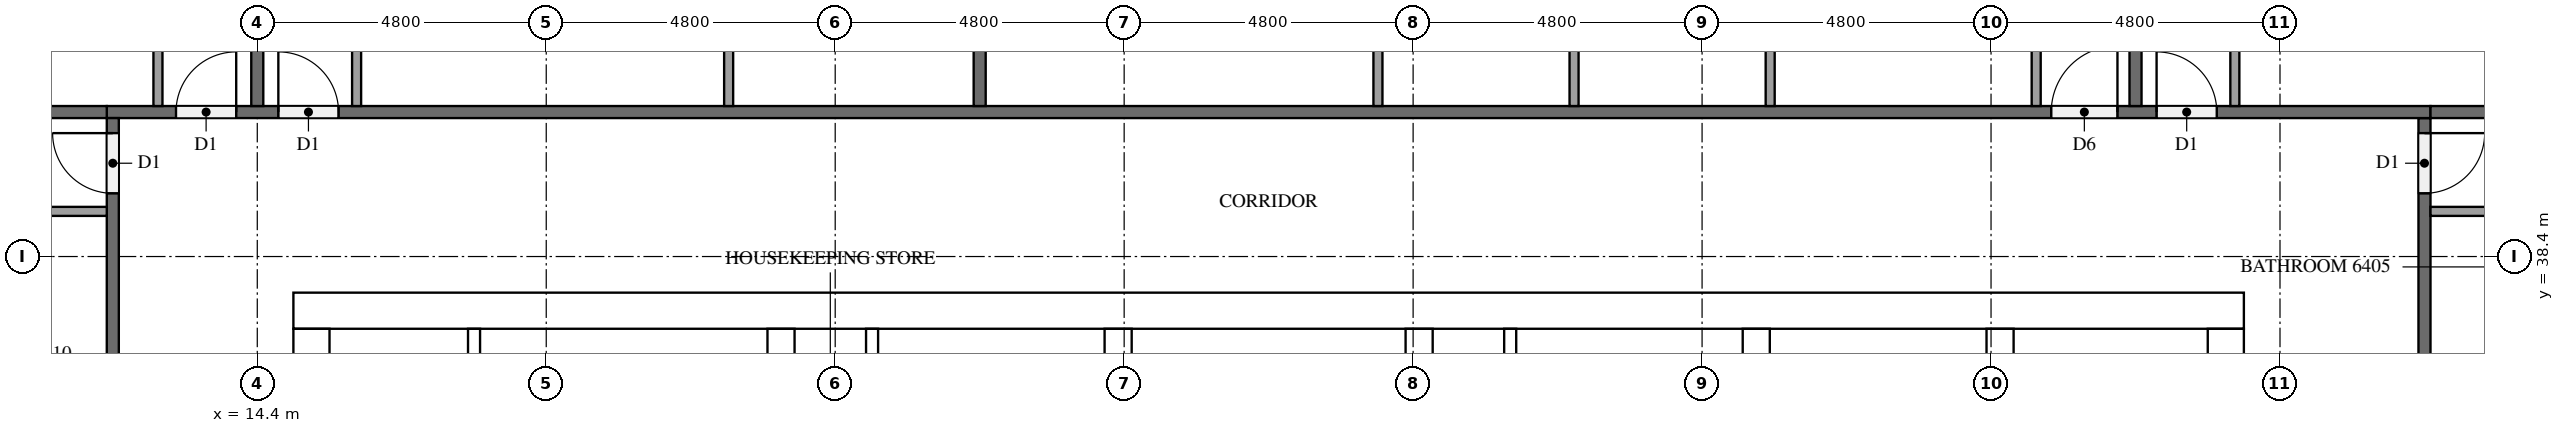
"""IFC4 building model, lengths in metres.
Left out: names, types, materials, properties, quantities, classifications, styles, units other than length and angle.
Written with IfcOpenShell. Run it as: python <this file> out.ifc"""

import sys

from ifc_helpers import new_model, si_unit, direction, frame, frame_2d, origin, place, context, subcontext, project, spatial, rectangle, extrude, element, fill, save


model = new_model("IFC4")
c1 = context("Model", 3, precision=1e-05, world=origin(), true_north=direction((0.0, 1.0)))
c2 = subcontext(c1, "Body", "Model", "MODEL_VIEW")
j1 = project(units=[si_unit("LENGTHUNIT", "METRE"), si_unit("PLANEANGLEUNIT", "RADIAN")], contexts=[c1])
p1 = place(None, origin())
s1 = spatial("IfcSite", under=j1, at=p1, CompositionType="ELEMENT")
p2 = place(p1, origin())
s2 = spatial("IfcBuilding", under=s1, at=p2, CompositionType="ELEMENT")
p3 = place(p2, frame((0.0, 0.0, 245.7)))
s3 = spatial("IfcBuildingStorey", under=s2, at=p3, CompositionType="ELEMENT", Elevation=245.7)
p4 = place(p3, frame((15.0, 37.5, 0.0), z_axis=(0.0, 0.0, 1.0), x_axis=(1.0, 0.0, 0.0)))
e1 = element("IfcWall", 1, at=p4, inside=s3, PredefinedType="SHEAR", context=c2, shape_type="SweptSolid", body=[
    extrude(rectangle(XDim=32.4, YDim=0.6, at=frame_2d((16.2, 0.0))), origin(), (0.0, 0.0, 1.0), 3.2),
])
p5 = place(p4, frame((15.3, 0.0, 0.0)))
e2 = element("IfcOpeningElement", 2, at=p5, cuts=e1, PredefinedType="OPENING", context=c2, shape_type="SweptSolid", body=[
    extrude(rectangle(XDim=1.8, YDim=2.1, at=frame_2d((0.9, 1.05))), frame((0.0, 0.31, 0.0), z_axis=(0.0, -1.0, 0.0), x_axis=(1.0, 0.0, 0.0)), (0.0, 0.0, 1.0), 0.62),
])
p6 = place(p4, frame((1.25, 0.0, 0.0)))
e3 = element("IfcOpeningElement", 3, at=p6, cuts=e1, PredefinedType="OPENING", context=c2, shape_type="SweptSolid", body=[
    extrude(rectangle(XDim=1.0, YDim=2.1, at=frame_2d((0.5, 1.05))), frame((0.0, 0.31, 0.0), z_axis=(0.0, -1.0, 0.0), x_axis=(1.0, 0.0, 0.0)), (0.0, 0.0, 1.0), 0.62),
])
p7 = place(p4, frame((4.988, 0.0, 0.0)))
e4 = element("IfcOpeningElement", 4, at=p7, cuts=e1, PredefinedType="OPENING", context=c2, shape_type="SweptSolid", body=[
    extrude(rectangle(XDim=1.0, YDim=2.1, at=frame_2d((0.5, 1.05))), frame((0.0, 0.31, 0.0), z_axis=(0.0, -1.0, 0.0), x_axis=(1.0, 0.0, 0.0)), (0.0, 0.0, 1.0), 0.62),
])
p8 = place(p3, frame((15.3, 15.6, 0.0), z_axis=(0.0, 0.0, 1.0), x_axis=(0.0, 1.0, 0.0)))
e5 = element("IfcWall", 5, at=p8, inside=s3, PredefinedType="SHEAR", context=c2, shape_type="SweptSolid", body=[
    extrude(rectangle(XDim=21.6, YDim=0.6, at=frame_2d((10.8, 0.0))), origin(), (0.0, 0.0, 1.0), 3.2),
])
p9 = place(p8, frame((5.16, 0.0, 0.0)))
e6 = element("IfcOpeningElement", 6, at=p9, cuts=e5, PredefinedType="OPENING", context=c2, shape_type="SweptSolid", body=[
    extrude(rectangle(XDim=1.2, YDim=2.1, at=frame_2d((0.6, 1.05))), frame((0.0, 0.31, 0.0), z_axis=(0.0, -1.0, 0.0), x_axis=(1.0, 0.0, 0.0)), (0.0, 0.0, 1.0), 0.62),
])
p10 = place(p3, frame((47.1, 15.6, 0.0), z_axis=(0.0, 0.0, 1.0), x_axis=(0.0, 1.0, 0.0)))
e7 = element("IfcWall", 7, at=p10, inside=s3, PredefinedType="SHEAR", context=c2, shape_type="SweptSolid", body=[
    extrude(rectangle(XDim=21.6, YDim=0.6, at=frame_2d((10.8, 0.0))), origin(), (0.0, 0.0, 1.0), 3.2),
])
p11 = place(p10, frame((10.5, 0.0, 0.0)))
e8 = element("IfcOpeningElement", 8, at=p11, cuts=e7, PredefinedType="OPENING", context=c2, shape_type="SweptSolid", body=[
    extrude(rectangle(XDim=1.2, YDim=2.1, at=frame_2d((0.6, 1.05))), frame((0.0, 0.31, 0.0), z_axis=(0.0, -1.0, 0.0), x_axis=(1.0, 0.0, 0.0)), (0.0, 0.0, 1.0), 0.62),
])
p12 = place(p3, frame((23.1, 15.6, 0.0), z_axis=(0.0, 0.0, 1.0), x_axis=(0.0, 1.0, 0.0)))
e9 = element("IfcWall", 9, at=p12, inside=s3, PredefinedType="SHEAR", context=c2, shape_type="SweptSolid", body=[
    extrude(rectangle(XDim=21.6, YDim=0.45, at=frame_2d((10.8, 0.0))), origin(), (0.0, 0.0, 1.0), 3.2),
])
p13 = place(p3, frame((39.3, 27.75, 0.0), z_axis=(0.0, 0.0, 1.0), x_axis=(0.0, 1.0, 0.0)))
e10 = element("IfcWall", 10, at=p13, inside=s3, PredefinedType="SHEAR", context=c2, shape_type="SweptSolid", body=[
    extrude(rectangle(XDim=9.45, YDim=0.45, at=frame_2d((4.725, 0.0))), origin(), (0.0, 0.0, 1.0), 3.2),
])
p14 = place(p3, frame((43.35, 27.75, 0.0), z_axis=(0.0, 0.0, 1.0), x_axis=(0.0, 1.0, 0.0)))
e11 = element("IfcWall", 11, at=p14, inside=s3, PredefinedType="SHEAR", context=c2, shape_type="SweptSolid", body=[
    extrude(rectangle(XDim=9.45, YDim=0.45, at=frame_2d((4.725, 0.0))), origin(), (0.0, 0.0, 1.0), 3.2),
])
p15 = place(p14, frame((7.65, 0.0, 0.0)))
e12 = element("IfcOpeningElement", 12, at=p15, cuts=e11, PredefinedType="OPENING", context=c2, shape_type="SweptSolid", body=[
    extrude(rectangle(XDim=1.2, YDim=2.1, at=frame_2d((0.6, 1.05))), frame((0.0, 0.235, 0.0), z_axis=(0.0, -1.0, 0.0), x_axis=(1.0, 0.0, 0.0)), (0.0, 0.0, 1.0), 0.47),
])
for number, where, z_axis, x_axis in (
    (13, (28.7, 33.775, 0.0), (0.0, 0.0, 1.0), (0.0, 1.0, 0.0)),
    (14, (33.7, 33.775, 0.0), (0.0, 0.0, 1.0), (0.0, 1.0, 0.0)),
):
    element("IfcWall", number, at=place(p3, frame(where, z_axis=z_axis, x_axis=x_axis)), inside=s3, PredefinedType="SHEAR", context=c2, shape_type="SweptSolid", body=[
        extrude(rectangle(XDim=3.425, YDim=0.45, at=frame_2d((1.712, 0.0))), origin(), (0.0, 0.0, 1.0), 3.2),
    ])
p16 = place(p3, frame((18.001, 31.475, 0.0), z_axis=(0.0, 0.0, 1.0), x_axis=(0.0, 1.0, 0.0)))
e15 = element("IfcWall", 15, at=p16, inside=s3, PredefinedType="PARTITIONING", context=c2, shape_type="SweptSolid", body=[
    extrude(rectangle(XDim=5.725, YDim=0.2, at=frame_2d((2.862, 0.0))), origin(), (0.0, 0.0, 1.0), 3.2),
])
for number, where, z_axis, x_axis in (
    (16, (24.613, 33.775, 0.0), (0.0, 0.0, 1.0), (0.0, 1.0, 0.0)),
    (17, (35.212, 33.775, 0.0), (0.0, 0.0, 1.0), (0.0, 1.0, 0.0)),
):
    element("IfcWall", number, at=place(p3, frame(where, z_axis=z_axis, x_axis=x_axis)), inside=s3, PredefinedType="PARTITIONING", context=c2, shape_type="SweptSolid", body=[
        extrude(rectangle(XDim=3.425, YDim=0.2, at=frame_2d((1.712, 0.0))), origin(), (0.0, 0.0, 1.0), 3.2),
    ])
p17 = place(p3, frame((50.4, 40.7, 0.0), z_axis=(0.0, 0.0, 1.0), x_axis=(0.0, -1.0, 0.0)))
e18 = element("IfcWall", 18, at=p17, inside=s3, PredefinedType="PARTITIONING", context=c2, shape_type="SweptSolid", body=[
    extrude(rectangle(XDim=28.6, YDim=0.2, at=frame_2d((14.3, 0.0))), origin(), (0.0, 0.0, 1.0), 3.2),
])
p18 = place(p17, frame((27.3, 0.0, 0.0)))
e19 = element("IfcOpeningElement", 19, at=p18, cuts=e18, PredefinedType="OPENING", context=c2, shape_type="SweptSolid", body=[
    extrude(rectangle(XDim=1.1, YDim=2.1, at=frame_2d((0.55, 1.05))), frame((0.0, 0.11, 0.0), z_axis=(0.0, -1.0, 0.0), x_axis=(1.0, 0.0, 0.0)), (0.0, 0.0, 1.0), 0.22),
])
p19 = place(p17, frame((0.25, 0.0, 0.0)))
e20 = element("IfcOpeningElement", 20, at=p19, cuts=e18, PredefinedType="OPENING", context=c2, shape_type="SweptSolid", body=[
    extrude(rectangle(XDim=1.0, YDim=2.1, at=frame_2d((0.5, 1.05))), frame((0.0, 0.11, 0.0), z_axis=(0.0, -1.0, 0.0), x_axis=(1.0, 0.0, 0.0)), (0.0, 0.0, 1.0), 0.22),
])
p20 = place(p3, frame((11.9, 40.8, 0.0), z_axis=(0.0, 0.0, 1.0), x_axis=(1.0, 0.0, 0.0)))
e21 = element("IfcWall", 21, at=p20, inside=s3, PredefinedType="PARTITIONING", context=c2, shape_type="SweptSolid", body=[
    extrude(rectangle(XDim=38.6, YDim=0.2, at=frame_2d((19.3, 0.0))), origin(), (0.0, 0.0, 1.0), 3.2),
])
p21 = place(p20, frame((34.05, 0.0, 0.0)))
e22 = element("IfcOpeningElement", 22, at=p21, cuts=e21, PredefinedType="OPENING", context=c2, shape_type="SweptSolid", body=[
    extrude(rectangle(XDim=1.0, YDim=2.1, at=frame_2d((0.5, 1.05))), frame((0.0, 0.11, 0.0), z_axis=(0.0, -1.0, 0.0), x_axis=(1.0, 0.0, 0.0)), (0.0, 0.0, 1.0), 0.22),
])
p22 = place(p20, frame((32.3, 0.0, 0.0)))
e23 = element("IfcOpeningElement", 23, at=p22, cuts=e21, PredefinedType="OPENING", context=c2, shape_type="SweptSolid", body=[
    extrude(rectangle(XDim=1.1, YDim=2.1, at=frame_2d((0.55, 1.05))), frame((0.0, 0.11, 0.0), z_axis=(0.0, -1.0, 0.0), x_axis=(1.0, 0.0, 0.0)), (0.0, 0.0, 1.0), 0.22),
])
p23 = place(p20, frame((2.85, 0.0, 0.0)))
e24 = element("IfcOpeningElement", 24, at=p23, cuts=e21, PredefinedType="OPENING", context=c2, shape_type="SweptSolid", body=[
    extrude(rectangle(XDim=1.0, YDim=2.1, at=frame_2d((0.5, 1.05))), frame((0.0, 0.11, 0.0), z_axis=(0.0, -1.0, 0.0), x_axis=(1.0, 0.0, 0.0)), (0.0, 0.0, 1.0), 0.22),
])
p24 = place(p20, frame((1.15, 0.0, 0.0)))
e25 = element("IfcOpeningElement", 25, at=p24, cuts=e21, PredefinedType="OPENING", context=c2, shape_type="SweptSolid", body=[
    extrude(rectangle(XDim=1.0, YDim=2.1, at=frame_2d((0.5, 1.05))), frame((0.0, 0.11, 0.0), z_axis=(0.0, -1.0, 0.0), x_axis=(1.0, 0.0, 0.0)), (0.0, 0.0, 1.0), 0.22),
])
p25 = place(p3, frame((12.0, 12.1, 0.0), z_axis=(0.0, 0.0, 1.0), x_axis=(0.0, 1.0, 0.0)))
e26 = element("IfcWall", 26, at=p25, inside=s3, PredefinedType="PARTITIONING", context=c2, shape_type="SweptSolid", body=[
    extrude(rectangle(XDim=28.6, YDim=0.2, at=frame_2d((14.3, 0.0))), origin(), (0.0, 0.0, 1.0), 3.2),
])
p26 = place(p25, frame((27.35, 0.0, 0.0)))
e27 = element("IfcOpeningElement", 27, at=p26, cuts=e26, PredefinedType="OPENING", context=c2, shape_type="SweptSolid", body=[
    extrude(rectangle(XDim=1.0, YDim=2.1, at=frame_2d((0.5, 1.05))), frame((0.0, 0.11, 0.0), z_axis=(0.0, -1.0, 0.0), x_axis=(1.0, 0.0, 0.0)), (0.0, 0.0, 1.0), 0.22),
])
p27 = place(p25, frame((17.75, 0.0, 0.0)))
e28 = element("IfcOpeningElement", 28, at=p27, cuts=e26, PredefinedType="OPENING", context=c2, shape_type="SweptSolid", body=[
    extrude(rectangle(XDim=1.0, YDim=2.1, at=frame_2d((0.5, 1.05))), frame((0.0, 0.11, 0.0), z_axis=(0.0, -1.0, 0.0), x_axis=(1.0, 0.0, 0.0)), (0.0, 0.0, 1.0), 0.22),
])
p28 = place(p25, frame((3.35, 0.0, 0.0)))
e29 = element("IfcOpeningElement", 29, at=p28, cuts=e26, PredefinedType="OPENING", context=c2, shape_type="SweptSolid", body=[
    extrude(rectangle(XDim=1.0, YDim=2.1, at=frame_2d((0.5, 1.05))), frame((0.0, 0.11, 0.0), z_axis=(0.0, -1.0, 0.0), x_axis=(1.0, 0.0, 0.0)), (0.0, 0.0, 1.0), 0.22),
])
p29 = place(p3, frame((50.5, 40.8, 0.0), z_axis=(0.0, 0.0, 1.0), x_axis=(1.0, 0.0, 0.0)))
e30 = element("IfcWall", 30, at=p29, inside=s3, PredefinedType="PARTITIONING", context=c2, shape_type="SweptSolid", body=[
    extrude(rectangle(XDim=7.0, YDim=0.2, at=frame_2d((3.5, 0.0))), origin(), (0.0, 0.0, 1.0), 3.2),
])
for number, where, z_axis, x_axis in (
    (31, (45.6, 52.7, 0.0), (0.0, 0.0, 1.0), (0.0, -1.0, 0.0)),
    (32, (26.4, 52.7, 0.0), (0.0, 0.0, 1.0), (0.0, -1.0, 0.0)),
):
    element("IfcWall", number, at=place(p3, frame(where, z_axis=z_axis, x_axis=x_axis)), inside=s3, PredefinedType="PARTITIONING", context=c2, shape_type="SweptSolid", body=[
        extrude(rectangle(XDim=11.8, YDim=0.2, at=frame_2d((5.9, 0.0))), origin(), (0.0, 0.0, 1.0), 3.2),
    ])
p30 = place(p3, frame((14.4, 52.525, 0.0), z_axis=(0.0, 0.0, 1.0), x_axis=(0.0, -1.0, 0.0)))
e33 = element("IfcWall", 33, at=p30, inside=s3, PredefinedType="PARTITIONING", context=c2, shape_type="SweptSolid", body=[
    extrude(rectangle(XDim=11.625, YDim=0.2, at=frame_2d((5.812, 0.0))), origin(), (0.0, 0.0, 1.0), 3.2),
])
p31 = place(p3, frame((0.1, 40.8, 0.0), z_axis=(0.0, 0.0, 1.0), x_axis=(1.0, 0.0, 0.0)))
e34 = element("IfcWall", 34, at=p31, inside=s3, PredefinedType="PARTITIONING", context=c2, shape_type="SweptSolid", body=[
    extrude(rectangle(XDim=11.8, YDim=0.2, at=frame_2d((5.9, 0.0))), origin(), (0.0, 0.0, 1.0), 3.2),
])
p32 = place(p3, frame((50.5, 39.15, 0.0), z_axis=(0.0, 0.0, 1.0), x_axis=(1.0, 0.0, 0.0)))
e35 = element("IfcWall", 35, at=p32, inside=s3, PredefinedType="PARTITIONING", context=c2, shape_type="SweptSolid", body=[
    extrude(rectangle(XDim=1.925, YDim=0.15, at=frame_2d((0.962, 0.0))), origin(), (0.0, 0.0, 1.0), 3.2),
])
p33 = place(p3, frame((47.25, 40.9, 0.0), z_axis=(0.0, 0.0, 1.0), x_axis=(0.0, 1.0, 0.0)))
e36 = element("IfcWall", 36, at=p33, inside=s3, PredefinedType="PARTITIONING", context=c2, shape_type="SweptSolid", body=[
    extrude(rectangle(XDim=4.325, YDim=0.15, at=frame_2d((2.163, 0.0))), origin(), (0.0, 0.0, 1.0), 3.2),
])
for number, where, z_axis, x_axis in (
    (37, (39.531, 40.9, 0.0), (0.0, 0.0, 1.0), (0.0, 1.0, 0.0)),
    (38, (36.273, 40.9, 0.0), (0.0, 0.0, 1.0), (0.0, 1.0, 0.0)),
    (39, (33.016, 40.9, 0.0), (0.0, 0.0, 1.0), (0.0, 1.0, 0.0)),
):
    element("IfcWall", number, at=place(p3, frame(where, z_axis=z_axis, x_axis=x_axis)), inside=s3, PredefinedType="PARTITIONING", context=c2, shape_type="SweptSolid", body=[
        extrude(rectangle(XDim=3.875, YDim=0.15, at=frame_2d((1.938, 0.0))), origin(), (0.0, 0.0, 1.0), 3.2),
    ])
p34 = place(p3, frame((43.95, 40.9, 0.0), z_axis=(0.0, 0.0, 1.0), x_axis=(0.0, 1.0, 0.0)))
e40 = element("IfcWall", 40, at=p34, inside=s3, PredefinedType="PARTITIONING", context=c2, shape_type="SweptSolid", body=[
    extrude(rectangle(XDim=4.025, YDim=0.15, at=frame_2d((2.013, 0.0))), origin(), (0.0, 0.0, 1.0), 3.2),
])
p35 = place(p3, frame((22.23, 40.9, 0.0), z_axis=(0.0, 0.0, 1.0), x_axis=(0.0, 1.0, 0.0)))
e41 = element("IfcWall", 41, at=p35, inside=s3, PredefinedType="PARTITIONING", context=c2, shape_type="SweptSolid", body=[
    extrude(rectangle(XDim=3.875, YDim=0.15, at=frame_2d((1.938, 0.0))), origin(), (0.0, 0.0, 1.0), 3.2),
])
p36 = place(p3, frame((16.05, 40.9, 0.0), z_axis=(0.0, 0.0, 1.0), x_axis=(0.0, 1.0, 0.0)))
e42 = element("IfcWall", 42, at=p36, inside=s3, PredefinedType="PARTITIONING", context=c2, shape_type="SweptSolid", body=[
    extrude(rectangle(XDim=4.025, YDim=0.15, at=frame_2d((2.013, 0.0))), origin(), (0.0, 0.0, 1.0), 3.2),
])
p37 = place(p3, frame((12.75, 40.9, 0.0), z_axis=(0.0, 0.0, 1.0), x_axis=(0.0, 1.0, 0.0)))
e43 = element("IfcWall", 43, at=p37, inside=s3, PredefinedType="PARTITIONING", context=c2, shape_type="SweptSolid", body=[
    extrude(rectangle(XDim=3.725, YDim=0.15, at=frame_2d((1.863, 0.0))), origin(), (0.0, 0.0, 1.0), 3.2),
])
p38 = place(p3, frame((11.9, 39.15, 0.0), z_axis=(0.0, 0.0, 1.0), x_axis=(-1.0, 0.0, 0.0)))
e44 = element("IfcWall", 44, at=p38, inside=s3, PredefinedType="PARTITIONING", context=c2, shape_type="SweptSolid", body=[
    extrude(rectangle(XDim=3.425, YDim=0.15, at=frame_2d((1.712, 0.0))), origin(), (0.0, 0.0, 1.0), 3.2),
])
p39 = place(p5, origin())
e45 = element("IfcDoor", 45, at=p39, inside=s3, OperationType="DOUBLE_DOOR_SINGLE_SWING", PredefinedType="DOOR", context=c2, shape_type="SweptSolid", body=[
    extrude(rectangle(XDim=1.8, YDim=2.1, at=frame_2d((0.9, 1.05))), frame((0.0, 0.025, 0.0), z_axis=(0.0, -1.0, 0.0), x_axis=(1.0, 0.0, 0.0)), (0.0, 0.0, 1.0), 0.05),
])
fill(e2, e45)
p40 = place(p6, origin())
e46 = element("IfcDoor", 46, at=p40, inside=s3, OperationType="SINGLE_SWING_LEFT", PredefinedType="DOOR", context=c2, shape_type="SweptSolid", body=[
    extrude(rectangle(XDim=1.0, YDim=2.1, at=frame_2d((0.5, 1.05))), frame((0.0, 0.025, 0.0), z_axis=(0.0, -1.0, 0.0), x_axis=(1.0, 0.0, 0.0)), (0.0, 0.0, 1.0), 0.05),
])
fill(e3, e46)
p41 = place(p7, origin())
e47 = element("IfcDoor", 47, at=p41, inside=s3, OperationType="SINGLE_SWING_RIGHT", PredefinedType="DOOR", context=c2, shape_type="SweptSolid", body=[
    extrude(rectangle(XDim=1.0, YDim=2.1, at=frame_2d((0.5, 1.05))), frame((0.0, 0.025, 0.0), z_axis=(0.0, -1.0, 0.0), x_axis=(1.0, 0.0, 0.0)), (0.0, 0.0, 1.0), 0.05),
])
fill(e4, e47)
p42 = place(p19, origin())
e48 = element("IfcDoor", 48, at=p42, inside=s3, OperationType="SINGLE_SWING_LEFT", PredefinedType="DOOR", context=c2, shape_type="SweptSolid", body=[
    extrude(rectangle(XDim=1.0, YDim=2.1, at=frame_2d((0.5, 1.05))), frame((0.0, 0.025, 0.0), z_axis=(0.0, -1.0, 0.0), x_axis=(1.0, 0.0, 0.0)), (0.0, 0.0, 1.0), 0.05),
])
fill(e20, e48)
p43 = place(p21, origin())
e49 = element("IfcDoor", 49, at=p43, inside=s3, OperationType="SINGLE_SWING_LEFT", PredefinedType="DOOR", context=c2, shape_type="SweptSolid", body=[
    extrude(rectangle(XDim=1.0, YDim=2.1, at=frame_2d((0.5, 1.05))), frame((0.0, 0.025, 0.0), z_axis=(0.0, -1.0, 0.0), x_axis=(1.0, 0.0, 0.0)), (0.0, 0.0, 1.0), 0.05),
])
fill(e22, e49)
p44 = place(p22, origin())
e50 = element("IfcDoor", 50, at=p44, inside=s3, OperationType="SINGLE_SWING_RIGHT", PredefinedType="DOOR", context=c2, shape_type="SweptSolid", body=[
    extrude(rectangle(XDim=1.1, YDim=2.1, at=frame_2d((0.55, 1.05))), frame((0.0, 0.025, 0.0), z_axis=(0.0, -1.0, 0.0), x_axis=(1.0, 0.0, 0.0)), (0.0, 0.0, 1.0), 0.05),
])
fill(e23, e50)
p45 = place(p23, origin())
e51 = element("IfcDoor", 51, at=p45, inside=s3, OperationType="SINGLE_SWING_LEFT", PredefinedType="DOOR", context=c2, shape_type="SweptSolid", body=[
    extrude(rectangle(XDim=1.0, YDim=2.1, at=frame_2d((0.5, 1.05))), frame((0.0, 0.025, 0.0), z_axis=(0.0, -1.0, 0.0), x_axis=(1.0, 0.0, 0.0)), (0.0, 0.0, 1.0), 0.05),
])
fill(e24, e51)
p46 = place(p24, origin())
e52 = element("IfcDoor", 52, at=p46, inside=s3, OperationType="SINGLE_SWING_RIGHT", PredefinedType="DOOR", context=c2, shape_type="SweptSolid", body=[
    extrude(rectangle(XDim=1.0, YDim=2.1, at=frame_2d((0.5, 1.05))), frame((0.0, 0.025, 0.0), z_axis=(0.0, -1.0, 0.0), x_axis=(1.0, 0.0, 0.0)), (0.0, 0.0, 1.0), 0.05),
])
fill(e25, e52)
p47 = place(p26, origin())
e53 = element("IfcDoor", 53, at=p47, inside=s3, OperationType="SINGLE_SWING_RIGHT", PredefinedType="DOOR", context=c2, shape_type="SweptSolid", body=[
    extrude(rectangle(XDim=1.0, YDim=2.1, at=frame_2d((0.5, 1.05))), frame((0.0, 0.025, 0.0), z_axis=(0.0, -1.0, 0.0), x_axis=(1.0, 0.0, 0.0)), (0.0, 0.0, 1.0), 0.05),
])
fill(e27, e53)
save(model, sys.argv[1])
